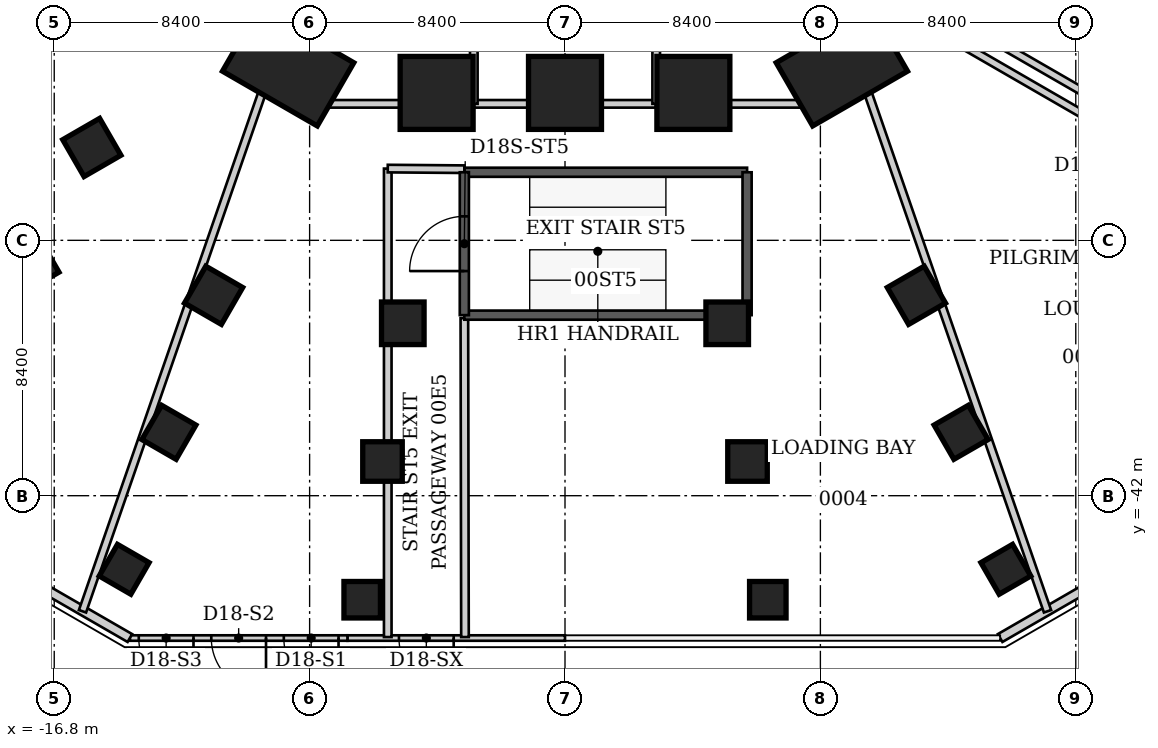
"""IFC4 building model, lengths in metres.
Left out: names, types, materials, properties, quantities, classifications, styles, units other than length and angle.
Written with IfcOpenShell. Run it as: python <this file> out.ifc"""

import sys

from ifc_helpers import new_model, si_unit, direction, frame, frame_2d, origin, origin_2d, place, context, subcontext, project, spatial, rectangle, extrude, element, fill, save


model = new_model("IFC4")
c1 = context("Model", 3, precision=1e-05, world=origin(), true_north=direction((0.0, 1.0)))
c2 = subcontext(c1, "Body", "Model", "MODEL_VIEW")
j1 = project(units=[si_unit("LENGTHUNIT", "METRE"), si_unit("PLANEANGLEUNIT", "RADIAN")], contexts=[c1])
p1 = place(None, origin())
s1 = spatial("IfcSite", under=j1, at=p1, CompositionType="ELEMENT")
p2 = place(p1, origin())
s2 = spatial("IfcBuilding", under=s1, at=p2, CompositionType="ELEMENT")
p3 = place(p2, origin())
s3 = spatial("IfcBuildingStorey", under=s2, at=p3, CompositionType="ELEMENT", Elevation=0.0)
p4 = place(p3, frame((9.106, -27.897, -0.2), z_axis=(0.0, 0.0, 1.0), x_axis=(0.5, -0.866025403784, 0.0)))
e1 = element("IfcColumn", 1, at=p4, inside=s3, PredefinedType="COLUMN", context=c2, shape_type="SweptSolid", body=[
    extrude(rectangle(XDim=2.4, YDim=3.6, at=origin_2d()), origin(), (0.0, 0.0, 1.0), 6.2),
])
for number, where, z_axis, x_axis in (
    (2, (4.222, -28.751, -0.2), (0.0, 0.0, 1.0), (0.0, -1.0, 0.0)),
    (3, (0.0, -28.751, -0.2), (0.0, 0.0, 1.0), (0.0, -1.0, 0.0)),
    (4, (-4.222, -28.751, -0.2), (0.0, 0.0, 1.0), (0.0, -1.0, 0.0)),
):
    element("IfcColumn", number, at=place(p3, frame(where, z_axis=z_axis, x_axis=x_axis)), inside=s3, PredefinedType="COLUMN", context=c2, shape_type="SweptSolid", body=[
        extrude(rectangle(XDim=2.4, YDim=2.4, at=origin_2d()), origin(), (0.0, 0.0, 1.0), 6.2),
    ])
p5 = place(p3, frame((-9.106, -27.897, -0.2), z_axis=(0.0, 0.0, 1.0), x_axis=(-0.5, -0.866025403784, 0.0)))
e5 = element("IfcColumn", 5, at=p5, inside=s3, PredefinedType="COLUMN", context=c2, shape_type="SweptSolid", body=[
    extrude(rectangle(XDim=2.4, YDim=3.6, at=origin_2d()), origin(), (0.0, 0.0, 1.0), 6.2),
])
for number, where, z_axis, x_axis in (
    (6, (11.558, -35.408, -0.2), (0.0, 0.0, 1.0), (0.5, -0.866, 0.0)),
    (7, (5.335, -36.329, -0.2), (0.0, 0.0, 1.0), (0.0, -1.0, 0.0)),
    (8, (-5.335, -36.329, -0.2), (0.0, 0.0, 1.0), (0.0, -1.0, 0.0)),
    (9, (-11.558, -35.408, -0.2), (0.0, 0.0, 1.0), (-0.5, -0.866, 0.0)),
    (10, (-15.563, -30.546, -0.2), (0.0, 0.0, 1.0), (-0.866, -0.5, 0.0)),
):
    element("IfcColumn", number, at=place(p3, frame(where, z_axis=z_axis, x_axis=x_axis)), inside=s3, PredefinedType="COLUMN", context=c2, shape_type="SweptSolid", body=[
        extrude(rectangle(XDim=1.4, YDim=1.4, at=origin_2d()), origin(), (0.0, 0.0, 1.0), 6.2),
    ])
for number, where, z_axis, x_axis in (
    (11, (13.029, -39.915, -0.2), (0.0, 0.0, 1.0), (0.5, -0.866, 0.0)),
    (12, (6.003, -40.875, -0.2), (0.0, 0.0, 1.0), (0.0, -1.0, 0.0)),
    (13, (-6.003, -40.875, -0.2), (0.0, 0.0, 1.0), (0.0, -1.0, 0.0)),
    (14, (-13.029, -39.915, -0.2), (0.0, 0.0, 1.0), (-0.5, -0.866, 0.0)),
    (15, (-17.532, -34.41, -0.2), (0.0, 0.0, 1.0), (-0.866, -0.5, 0.0)),
):
    element("IfcColumn", number, at=place(p3, frame(where, z_axis=z_axis, x_axis=x_axis)), inside=s3, PredefinedType="COLUMN", context=c2, shape_type="SweptSolid", body=[
        extrude(rectangle(XDim=1.3, YDim=1.3, at=origin_2d()), origin(), (0.0, 0.0, 1.0), 6.2),
    ])
for number, where, z_axis, x_axis in (
    (16, (14.5, -44.421, -0.2), (0.0, 0.0, 1.0), (0.5, -0.866, 0.0)),
    (17, (6.671, -45.422, -0.2), (0.0, 0.0, 1.0), (0.0, -1.0, 0.0)),
    (18, (-6.671, -45.422, -0.2), (0.0, 0.0, 1.0), (0.0, -1.0, 0.0)),
    (19, (-14.5, -44.421, -0.2), (0.0, 0.0, 1.0), (-0.5, -0.866, 0.0)),
):
    element("IfcColumn", number, at=place(p3, frame(where, z_axis=z_axis, x_axis=x_axis)), inside=s3, PredefinedType="COLUMN", context=c2, shape_type="SweptSolid", body=[
        extrude(rectangle(XDim=1.2, YDim=1.2, at=origin_2d()), origin(), (0.0, 0.0, 1.0), 6.2),
    ])
p6 = place(p3, frame((16.997, -45.132, 0.0), z_axis=(0.0, 0.0, 1.0), x_axis=(-0.86600983753, -0.500026960575, 0.0)))
e20 = element("IfcWall", 20, at=p6, inside=s3, PredefinedType="SOLIDWALL", context=c2, shape_type="SweptSolid", body=[
    extrude(rectangle(XDim=3.1, YDim=0.3, at=frame_2d((1.55, 0.0))), origin(), (0.0, 0.0, 1.0), 5.84),
])
p7 = place(p3, frame((0.0, -46.682, 0.0), z_axis=(0.0, 0.0, 1.0), x_axis=(-1.0, 0.0, 0.0)))
e21 = element("IfcWall", 21, at=p7, inside=s3, PredefinedType="SOLIDWALL", context=c2, shape_type="SweptSolid", body=[
    extrude(rectangle(XDim=7.156, YDim=0.18, at=frame_2d((3.578, 0.0))), origin(), (0.0, 0.0, 1.0), 5.84),
])
p8 = place(p7, frame((3.661, 0.0, 0.0)))
e22 = element("IfcOpeningElement", 22, at=p8, cuts=e21, PredefinedType="OPENING", context=c2, shape_type="SweptSolid", body=[
    extrude(rectangle(XDim=1.8, YDim=2.7, at=frame_2d((0.9, 1.35))), frame((0.0, 0.09, 0.0), z_axis=(0.0, -1.0, 0.0), x_axis=(1.0, 0.0, 0.0)), (0.0, 0.0, 1.0), 0.18),
])
p9 = place(p3, frame((-7.156, -46.682, 0.0), z_axis=(0.0, 0.0, 1.0), x_axis=(-1.0, 0.0, 0.0)))
e23 = element("IfcWall", 23, at=p9, inside=s3, PredefinedType="SOLIDWALL", context=c2, shape_type="SweptSolid", body=[
    extrude(rectangle(XDim=7.156, YDim=0.18, at=frame_2d((3.578, 0.0))), origin(), (0.0, 0.0, 1.0), 5.84),
])
p10 = place(p9, frame((0.293, 0.0, 0.0)))
e24 = element("IfcOpeningElement", 24, at=p10, cuts=e23, PredefinedType="OPENING", context=c2, shape_type="SweptSolid", body=[
    extrude(rectangle(XDim=1.8, YDim=2.7, at=frame_2d((0.9, 1.35))), frame((0.0, 0.09, 0.0), z_axis=(0.0, -1.0, 0.0), x_axis=(1.0, 0.0, 0.0)), (0.0, 0.0, 1.0), 0.18),
])
p11 = place(p9, frame((2.678, 0.0, 0.0)))
e25 = element("IfcOpeningElement", 25, at=p11, cuts=e23, PredefinedType="OPENING", context=c2, shape_type="SweptSolid", body=[
    extrude(rectangle(XDim=1.8, YDim=2.7, at=frame_2d((0.9, 1.35))), frame((0.0, 0.09, 0.0), z_axis=(0.0, -1.0, 0.0), x_axis=(1.0, 0.0, 0.0)), (0.0, 0.0, 1.0), 0.18),
])
p12 = place(p9, frame((5.063, 0.0, 0.0)))
e26 = element("IfcOpeningElement", 26, at=p12, cuts=e23, PredefinedType="OPENING", context=c2, shape_type="SweptSolid", body=[
    extrude(rectangle(XDim=1.8, YDim=2.7, at=frame_2d((0.9, 1.35))), frame((0.0, 0.09, 0.0), z_axis=(0.0, -1.0, 0.0), x_axis=(1.0, 0.0, 0.0)), (0.0, 0.0, 1.0), 0.18),
])
p13 = place(p3, frame((-14.312, -46.682, 0.0), z_axis=(0.0, 0.0, 1.0), x_axis=(-0.86600983753, 0.500026960575, 0.0)))
e27 = element("IfcWall", 27, at=p13, inside=s3, PredefinedType="SOLIDWALL", context=c2, shape_type="SweptSolid", body=[
    extrude(rectangle(XDim=3.1, YDim=0.3, at=frame_2d((1.55, 0.0))), origin(), (0.0, 0.0, 1.0), 5.84),
])
p14 = place(p3, frame((-17.08, -16.52, 0.0), z_axis=(0.0, 0.0, 1.0), x_axis=(0.500484795969, -0.865745325719, 0.0)))
e28 = element("IfcWall", 28, at=p14, inside=s3, PredefinedType="PARTITIONING", context=c2, shape_type="SweptSolid", body=[
    extrude(rectangle(XDim=13.387, YDim=0.25, at=frame_2d((6.694, 0.0))), origin(), (0.0, 0.0, 1.0), 4.04),
])
p15 = place(p3, frame((-15.87, -45.802, 0.0), z_axis=(0.0, 0.0, 1.0), x_axis=(0.327267371913, 0.944931779168, 0.0)))
e29 = element("IfcWall", 29, at=p15, inside=s3, PredefinedType="PARTITIONING", context=c2, shape_type="SweptSolid", body=[
    extrude(rectangle(XDim=18.395, YDim=0.25, at=frame_2d((9.197, 0.0))), origin(), (0.0, 0.0, 1.0), 5.75),
])
p16 = place(p3, frame((-10.38, -28.11, 0.0), z_axis=(0.0, 0.0, 1.0), x_axis=(0.865714845822, -0.5005375168, 0.0)))
e30 = element("IfcWall", 30, at=p16, inside=s3, PredefinedType="PARTITIONING", context=c2, shape_type="SweptSolid", body=[
    extrude(rectangle(XDim=0.579, YDim=0.25, at=frame_2d((0.29, 0.0))), origin(), (0.0, 0.0, 1.0), 5.84),
])
p17 = place(p3, frame((-8.65, -29.11, 0.0), z_axis=(0.0, 0.0, 1.0), x_axis=(-0.866883441829, 0.498510880807, 0.0)))
e31 = element("IfcWall", 31, at=p17, inside=s3, PredefinedType="PARTITIONING", context=c2, shape_type="SweptSolid", body=[
    extrude(rectangle(XDim=1.385, YDim=0.25, at=frame_2d((0.692, 0.0))), origin(), (0.0, 0.0, 1.0), 5.84),
])
p18 = place(p3, frame((-8.65, -29.11, 0.0), z_axis=(0.0, 0.0, 1.0), x_axis=(1.0, 0.0, 0.0)))
e32 = element("IfcWall", 32, at=p18, inside=s3, PredefinedType="PARTITIONING", context=c2, shape_type="SweptSolid", body=[
    extrude(rectangle(XDim=5.65, YDim=0.25, at=frame_2d((2.825, 0.0))), origin(), (0.0, 0.0, 1.0), 4.04),
])
p19 = place(p3, frame((-5.83, -31.24, 0.0), z_axis=(0.0, 0.0, 1.0), x_axis=(0.0, -1.0, 0.0)))
e33 = element("IfcWall", 33, at=p19, inside=s3, PredefinedType="PARTITIONING", context=c2, shape_type="SweptSolid", body=[
    extrude(rectangle(XDim=15.41, YDim=0.25, at=frame_2d((7.705, 0.0))), origin(), (0.0, 0.0, 1.0), 5.083),
])
p20 = place(p3, frame((-3.31, -31.26, 0.0), z_axis=(0.0, 0.0, 1.0), x_axis=(-0.999968446362, 0.007943946193, 0.0)))
e34 = element("IfcWall", 34, at=p20, inside=s3, PredefinedType="PARTITIONING", context=c2, shape_type="SweptSolid", body=[
    extrude(rectangle(XDim=2.52, YDim=0.25, at=frame_2d((1.26, 0.0))), origin(), (0.0, 0.0, 1.0), 5.84),
])
p21 = place(p3, frame((-3.29, -46.65, 0.0), z_axis=(0.0, 0.0, 1.0), x_axis=(-0.001908437887, 0.999998178931, 0.0)))
e35 = element("IfcWall", 35, at=p21, inside=s3, PredefinedType="PARTITIONING", context=c2, shape_type="SweptSolid", body=[
    extrude(rectangle(XDim=10.49, YDim=0.25, at=frame_2d((5.245, 0.0))), origin(), (0.0, 0.0, 1.0), 5.75),
])
p22 = place(p3, frame((-3.0, -29.11, 0.0), z_axis=(0.0, 0.0, 1.0), x_axis=(1.0, 0.0, 0.0)))
e36 = element("IfcWall", 36, at=p22, inside=s3, PredefinedType="PARTITIONING", context=c2, shape_type="SweptSolid", body=[
    extrude(rectangle(XDim=6.0, YDim=0.25, at=frame_2d((3.0, 0.0))), origin(), (0.0, 0.0, 1.0), 4.04),
])
p23 = place(p3, frame((-3.0, -16.52, 0.0), z_axis=(0.0, 0.0, 1.0), x_axis=(0.0, -1.0, 0.0)))
e37 = element("IfcWall", 37, at=p23, inside=s3, PredefinedType="PARTITIONING", context=c2, shape_type="SweptSolid", body=[
    extrude(rectangle(XDim=12.59, YDim=0.25, at=frame_2d((6.295, 0.0))), origin(), (0.0, 0.0, 1.0), 5.84),
])
p24 = place(p3, frame((3.0, -29.11, 0.0), z_axis=(0.0, 0.0, 1.0), x_axis=(1.0, 0.0, 0.0)))
e38 = element("IfcWall", 38, at=p24, inside=s3, PredefinedType="PARTITIONING", context=c2, shape_type="SweptSolid", body=[
    extrude(rectangle(XDim=5.65, YDim=0.25, at=frame_2d((2.825, 0.0))), origin(), (0.0, 0.0, 1.0), 4.04),
])
p25 = place(p3, frame((3.0, -16.52, 0.0), z_axis=(0.0, 0.0, 1.0), x_axis=(0.0, -1.0, 0.0)))
e39 = element("IfcWall", 39, at=p25, inside=s3, PredefinedType="PARTITIONING", context=c2, shape_type="SweptSolid", body=[
    extrude(rectangle(XDim=12.59, YDim=0.25, at=frame_2d((6.295, 0.0))), origin(), (0.0, 0.0, 1.0), 5.84),
])
p26 = place(p3, frame((8.65, -29.11, 0.0), z_axis=(0.0, 0.0, 1.0), x_axis=(0.865736025111, 0.500500883941, 0.0)))
e40 = element("IfcWall", 40, at=p26, inside=s3, PredefinedType="PARTITIONING", context=c2, shape_type="SweptSolid", body=[
    extrude(rectangle(XDim=1.384, YDim=0.25, at=frame_2d((0.692, 0.0))), origin(), (0.0, 0.0, 1.0), 5.84),
])
p27 = place(p3, frame((9.85, -28.42, 0.0), z_axis=(0.0, 0.0, 1.0), x_axis=(0.327267371913, -0.944931779168, 0.0)))
e41 = element("IfcWall", 41, at=p27, inside=s3, PredefinedType="PARTITIONING", context=c2, shape_type="SweptSolid", body=[
    extrude(rectangle(XDim=18.395, YDim=0.25, at=frame_2d((9.197, 0.0))), origin(), (0.0, 0.0, 1.0), 5.75),
])
p28 = place(p3, frame((10.38, -28.11, 0.0), z_axis=(0.0, 0.0, 1.0), x_axis=(-0.865714845822, -0.5005375168, 0.0)))
e42 = element("IfcWall", 42, at=p28, inside=s3, PredefinedType="PARTITIONING", context=c2, shape_type="SweptSolid", body=[
    extrude(rectangle(XDim=0.579, YDim=0.25, at=frame_2d((0.29, 0.0))), origin(), (0.0, 0.0, 1.0), 5.84),
])
p29 = place(p3, frame((10.38, -28.11, 0.0), z_axis=(0.0, 0.0, 1.0), x_axis=(0.500126914667, 0.865952117167, 0.0)))
e43 = element("IfcWall", 43, at=p29, inside=s3, PredefinedType="PARTITIONING", context=c2, shape_type="SweptSolid", body=[
    extrude(rectangle(XDim=2.16, YDim=0.25, at=frame_2d((1.08, 0.0))), origin(), (0.0, 0.0, 1.0), 5.84),
])
p30 = place(p3, frame((13.63, -26.75, 0.0), z_axis=(0.0, 0.0, 1.0), x_axis=(0.866259937365, -0.49959355572, 0.0)))
e44 = element("IfcWall", 44, at=p30, inside=s3, PredefinedType="PARTITIONING", context=c2, shape_type="SweptSolid", body=[
    extrude(rectangle(XDim=12.08, YDim=0.25, at=frame_2d((6.04, 0.0))), origin(), (0.0, 0.0, 1.0), 5.75),
])
p31 = place(p3, frame((23.764, -33.345, 0.0), z_axis=(0.0, 0.0, 1.0), x_axis=(-0.865986126124, 0.500068024733, 0.0)))
e45 = element("IfcWall", 45, at=p31, inside=s3, PredefinedType="PARTITIONING", context=c2, shape_type="SweptSolid", body=[
    extrude(rectangle(XDim=14.208, YDim=0.25, at=frame_2d((7.104, 0.0))), origin(), (0.0, 0.0, 1.0), 5.75),
])
p32 = place(p31, frame((6.554, 0.0, 0.0)))
e46 = element("IfcOpeningElement", 46, at=p32, cuts=e45, PredefinedType="OPENING", context=c2, shape_type="SweptSolid", body=[
    extrude(rectangle(XDim=1.1, YDim=2.2, at=frame_2d((0.55, 1.1))), frame((0.0, 0.125, 0.0), z_axis=(0.0, -1.0, 0.0), x_axis=(1.0, 0.0, 0.0)), (0.0, 0.0, 1.0), 0.25),
])
p33 = place(p3, frame((-3.311, -31.361, 0.0), z_axis=(0.0, 0.0, 1.0), x_axis=(1.0, 0.0, 0.0)))
e47 = element("IfcWall", 47, at=p33, inside=s3, PredefinedType="SHEAR", context=c2, shape_type="SweptSolid", body=[
    extrude(rectangle(XDim=9.3, YDim=0.3, at=frame_2d((4.65, 0.0))), origin(), (0.0, 0.0, 1.0), 6.0),
])
p34 = place(p3, frame((5.989, -31.361, 0.0), z_axis=(0.0, 0.0, 1.0), x_axis=(0.0, -1.0, 0.0)))
e48 = element("IfcWall", 48, at=p34, inside=s3, PredefinedType="SHEAR", context=c2, shape_type="SweptSolid", body=[
    extrude(rectangle(XDim=4.7, YDim=0.3, at=frame_2d((2.35, 0.0))), origin(), (0.0, 0.0, 1.0), 6.0),
])
p35 = place(p3, frame((5.989, -36.061, 0.0), z_axis=(0.0, 0.0, 1.0), x_axis=(-1.0, 0.0, 0.0)))
e49 = element("IfcWall", 49, at=p35, inside=s3, PredefinedType="SHEAR", context=c2, shape_type="SweptSolid", body=[
    extrude(rectangle(XDim=9.3, YDim=0.3, at=frame_2d((4.65, 0.0))), origin(), (0.0, 0.0, 1.0), 6.0),
])
p36 = place(p3, frame((-3.311, -36.061, 0.0), z_axis=(0.0, 0.0, 1.0), x_axis=(0.0, 1.0, 0.0)))
e50 = element("IfcWall", 50, at=p36, inside=s3, PredefinedType="SHEAR", context=c2, shape_type="SweptSolid", body=[
    extrude(rectangle(XDim=4.7, YDim=0.3, at=frame_2d((2.35, 0.0))), origin(), (0.0, 0.0, 1.0), 6.0),
])
p37 = place(p36, frame((1.45, 0.0, 0.0)))
e51 = element("IfcOpeningElement", 51, at=p37, cuts=e50, PredefinedType="OPENING", context=c2, shape_type="SweptSolid", body=[
    extrude(rectangle(XDim=1.8, YDim=2.4, at=frame_2d((0.9, 1.2))), frame((0.0, 0.15, 0.0), z_axis=(0.0, -1.0, 0.0), x_axis=(1.0, 0.0, 0.0)), (0.0, 0.0, 1.0), 0.3),
])
p38 = place(p8, origin())
e52 = element("IfcDoor", 52, at=p38, inside=s3, OperationType="SINGLE_SWING_LEFT", PredefinedType="DOOR", context=c2, shape_type="SweptSolid", body=[
    extrude(rectangle(XDim=1.8, YDim=2.7, at=frame_2d((0.9, 1.35))), frame((0.0, 0.025, 0.0), z_axis=(0.0, -1.0, 0.0), x_axis=(1.0, 0.0, 0.0)), (0.0, 0.0, 1.0), 0.05),
])
fill(e22, e52)
p39 = place(p10, origin())
e53 = element("IfcDoor", 53, at=p39, inside=s3, OperationType="SINGLE_SWING_LEFT", PredefinedType="DOOR", context=c2, shape_type="SweptSolid", body=[
    extrude(rectangle(XDim=1.8, YDim=2.7, at=frame_2d((0.9, 1.35))), frame((0.0, 0.025, 0.0), z_axis=(0.0, -1.0, 0.0), x_axis=(1.0, 0.0, 0.0)), (0.0, 0.0, 1.0), 0.05),
])
fill(e24, e53)
p40 = place(p11, origin())
e54 = element("IfcDoor", 54, at=p40, inside=s3, OperationType="SINGLE_SWING_LEFT", PredefinedType="DOOR", context=c2, shape_type="SweptSolid", body=[
    extrude(rectangle(XDim=1.8, YDim=2.7, at=frame_2d((0.9, 1.35))), frame((0.0, 0.025, 0.0), z_axis=(0.0, -1.0, 0.0), x_axis=(1.0, 0.0, 0.0)), (0.0, 0.0, 1.0), 0.05),
])
fill(e25, e54)
p41 = place(p12, origin())
e55 = element("IfcDoor", 55, at=p41, inside=s3, OperationType="SINGLE_SWING_LEFT", PredefinedType="DOOR", context=c2, shape_type="SweptSolid", body=[
    extrude(rectangle(XDim=1.8, YDim=2.7, at=frame_2d((0.9, 1.35))), frame((0.0, 0.025, 0.0), z_axis=(0.0, -1.0, 0.0), x_axis=(1.0, 0.0, 0.0)), (0.0, 0.0, 1.0), 0.05),
])
fill(e26, e55)
p42 = place(p37, origin())
e56 = element("IfcDoor", 56, at=p42, inside=s3, OperationType="DOUBLE_DOOR_SINGLE_SWING", PredefinedType="DOOR", context=c2, shape_type="SweptSolid", body=[
    extrude(rectangle(XDim=1.8, YDim=2.4, at=frame_2d((0.9, 1.2))), frame((0.0, 0.025, 0.0), z_axis=(0.0, -1.0, 0.0), x_axis=(1.0, 0.0, 0.0)), (0.0, 0.0, 1.0), 0.05),
])
fill(e51, e56)
save(model, sys.argv[1])
